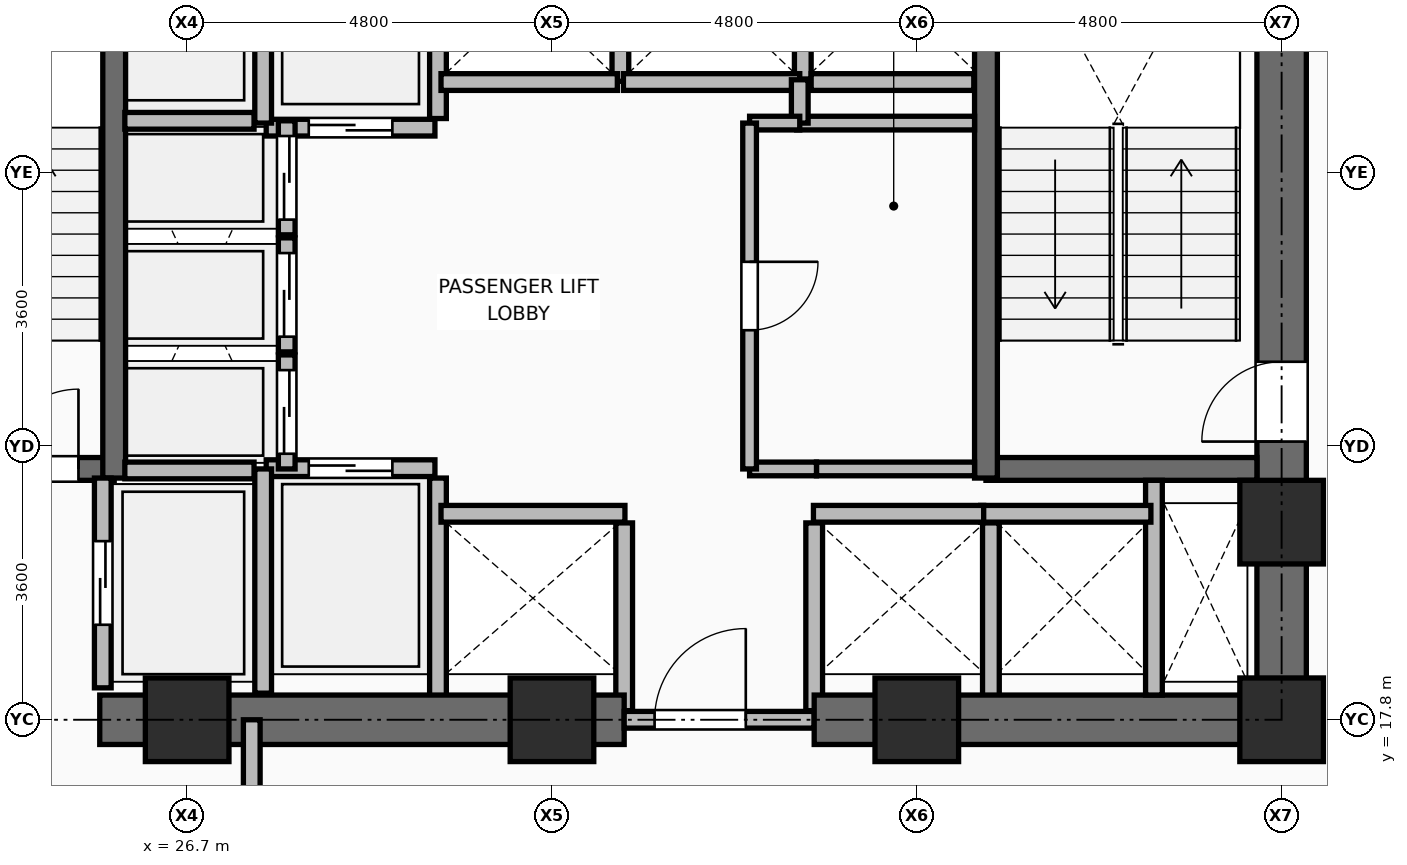
"""IFC4 building model, lengths in metres.
Left out: names, types, materials, properties, quantities, classifications, styles, units other than length and angle.
Written with IfcOpenShell. Run it as: python <this file> out.ifc"""

import sys

from ifc_helpers import new_model, si_unit, direction, frame, frame_2d, origin, origin_2d, place, context, subcontext, project, spatial, rectangle, extrude, element, fill, save


model = new_model("IFC4")
c1 = context("Model", 3, precision=1e-05, world=origin(), true_north=direction((0.0, 1.0)))
c2 = subcontext(c1, "Body", "Model", "MODEL_VIEW")
j1 = project(units=[si_unit("LENGTHUNIT", "METRE"), si_unit("PLANEANGLEUNIT", "RADIAN")], contexts=[c1])
p1 = place(None, origin())
s1 = spatial("IfcSite", under=j1, at=p1, CompositionType="ELEMENT")
p2 = place(p1, origin())
s2 = spatial("IfcBuilding", under=s1, at=p2, CompositionType="ELEMENT")
p3 = place(p2, frame((0.0, 0.0, 57.0)))
s3 = spatial("IfcBuildingStorey", under=s2, at=p3, CompositionType="ELEMENT", Elevation=57.0)
for number, where, z_axis, x_axis in (
    (1, (26.7, 17.8, 0.0), (0.0, 0.0, 1.0), (1.0, 0.0, 0.0)),
    (2, (31.5, 17.8, 0.0), (0.0, 0.0, 1.0), (1.0, 0.0, 0.0)),
    (3, (36.3, 17.8, 0.0), (0.0, 0.0, 1.0), (1.0, 0.0, 0.0)),
    (4, (41.1, 17.8, 0.0), (0.0, 0.0, 1.0), (1.0, 0.0, 0.0)),
    (5, (41.1, 20.4, 0.0), (0.0, 0.0, 1.0), (1.0, 0.0, 0.0)),
):
    element("IfcColumn", number, at=place(p3, frame(where, z_axis=z_axis, x_axis=x_axis)), inside=s3, PredefinedType="COLUMN", context=c2, shape_type="SweptSolid", body=[
        extrude(rectangle(XDim=1.1, YDim=1.1, at=origin_2d()), origin(), (0.0, 0.0, 1.0), 3.75),
    ])
p4 = place(p3, frame((30.0, 18.08, 0.0), z_axis=(0.0, 0.0, 1.0), x_axis=(0.0, 1.0, 0.0)))
e6 = element("IfcWall", 6, at=p4, inside=s3, PredefinedType="PARTITIONING", context=c2, shape_type="SweptSolid", body=[
    extrude(rectangle(XDim=2.9, YDim=0.22, at=frame_2d((1.45, 0.0))), origin(), (0.0, 0.0, 1.0), 3.545),
])
for number, where, z_axis, x_axis in (
    (7, (32.45, 17.92, 0.0), (0.0, 0.0, 1.0), (0.0, 1.0, 0.0)),
    (8, (34.95, 17.92, 0.0), (0.0, 0.0, 1.0), (0.0, 1.0, 0.0)),
):
    element("IfcWall", number, at=place(p3, frame(where, z_axis=z_axis, x_axis=x_axis)), inside=s3, PredefinedType="PARTITIONING", context=c2, shape_type="SweptSolid", body=[
        extrude(rectangle(XDim=2.47, YDim=0.22, at=frame_2d((1.235, 0.0))), origin(), (0.0, 0.0, 1.0), 2.928),
    ])
p5 = place(p3, frame((37.275, 18.08, 0.0), z_axis=(0.0, 0.0, 1.0), x_axis=(0.0, 1.0, 0.0)))
e9 = element("IfcWall", 9, at=p5, inside=s3, PredefinedType="PARTITIONING", context=c2, shape_type="SweptSolid", body=[
    extrude(rectangle(XDim=2.31, YDim=0.22, at=frame_2d((1.155, 0.0))), origin(), (0.0, 0.0, 1.0), 3.545),
])
p6 = place(p3, frame((30.0, 25.71, 0.0), z_axis=(0.0, 0.0, 1.0), x_axis=(0.0, 1.0, 0.0)))
e10 = element("IfcWall", 10, at=p6, inside=s3, PredefinedType="PARTITIONING", context=c2, shape_type="SweptSolid", body=[
    extrude(rectangle(XDim=2.73, YDim=0.22, at=frame_2d((1.365, 0.0))), origin(), (0.0, 0.0, 1.0), 3.545),
])
p7 = place(p3, frame((32.4, 26.2, 0.0), z_axis=(0.0, 0.0, 1.0), x_axis=(0.0, 1.0, 0.0)))
e11 = element("IfcWall", 11, at=p7, inside=s3, PredefinedType="PARTITIONING", context=c2, shape_type="SweptSolid", body=[
    extrude(rectangle(XDim=2.24, YDim=0.22, at=frame_2d((1.12, 0.0))), origin(), (0.0, 0.0, 1.0), 3.545),
])
p8 = place(p3, frame((34.8, 26.23, 0.0), z_axis=(0.0, 0.0, 1.0), x_axis=(0.0, 1.0, 0.0)))
e12 = element("IfcWall", 12, at=p8, inside=s3, PredefinedType="PARTITIONING", context=c2, shape_type="SweptSolid", body=[
    extrude(rectangle(XDim=2.21, YDim=0.22, at=frame_2d((1.105, 0.0))), origin(), (0.0, 0.0, 1.0), 3.545),
])
p9 = place(p3, frame((34.91, 26.19, 0.0), z_axis=(0.0, 0.0, 1.0), x_axis=(1.0, 0.0, 0.0)))
e13 = element("IfcWall", 13, at=p9, inside=s3, PredefinedType="PARTITIONING", context=c2, shape_type="SweptSolid", body=[
    extrude(rectangle(XDim=2.14, YDim=0.22, at=frame_2d((1.07, 0.0))), origin(), (0.0, 0.0, 1.0), 3.545),
])
p10 = place(p3, frame((25.55, 17.8, 0.0), z_axis=(0.0, 0.0, 1.0), x_axis=(1.0, 0.0, 0.0)))
e14 = element("IfcWall", 14, at=p10, inside=s3, PredefinedType="SHEAR", context=c2, shape_type="SweptSolid", body=[
    extrude(rectangle(XDim=6.9, YDim=0.65, at=frame_2d((3.45, 0.0))), origin(), (0.0, 0.0, 1.0), 3.57),
])
p11 = place(p3, frame((32.45, 17.8, 0.0), z_axis=(0.0, 0.0, 1.0), x_axis=(1.0, 0.0, 0.0)))
e15 = element("IfcWall", 15, at=p11, inside=s3, PredefinedType="PARTITIONING", context=c2, shape_type="SweptSolid", body=[
    extrude(rectangle(XDim=2.5, YDim=0.22, at=frame_2d((1.25, 0.0))), origin(), (0.0, 0.0, 1.0), 2.928),
])
p12 = place(p11, frame((0.4, 0.0, 0.0)))
e16 = element("IfcOpeningElement", 16, at=p12, cuts=e15, PredefinedType="OPENING", context=c2, shape_type="SweptSolid", body=[
    extrude(rectangle(XDim=1.2, YDim=2.1, at=frame_2d((0.6, 1.05))), frame((0.0, 0.12, 0.0), z_axis=(0.0, -1.0, 0.0), x_axis=(1.0, 0.0, 0.0)), (0.0, 0.0, 1.0), 0.24),
])
p13 = place(p3, frame((34.95, 17.8, 0.0), z_axis=(0.0, 0.0, 1.0), x_axis=(1.0, 0.0, 0.0)))
e17 = element("IfcWall", 17, at=p13, inside=s3, PredefinedType="SHEAR", context=c2, shape_type="SweptSolid", body=[
    extrude(rectangle(XDim=6.475, YDim=0.65, at=frame_2d((3.238, 0.0))), origin(), (0.0, 0.0, 1.0), 3.57),
])
p14 = place(p3, frame((41.1, 18.125, 0.0), z_axis=(0.0, 0.0, 1.0), x_axis=(0.0, 1.0, 0.0)))
e18 = element("IfcWall", 18, at=p14, inside=s3, PredefinedType="SHEAR", context=c2, shape_type="SweptSolid", body=[
    extrude(rectangle(XDim=14.0, YDim=0.65, at=frame_2d((7.0, 0.0))), origin(), (0.0, 0.0, 1.0), 3.57),
])
p15 = place(p14, frame((3.335, 0.0, 0.0)))
e19 = element("IfcOpeningElement", 19, at=p15, cuts=e18, PredefinedType="OPENING", context=c2, shape_type="SweptSolid", body=[
    extrude(rectangle(XDim=1.05, YDim=2.1, at=frame_2d((0.525, 1.05))), frame((0.0, 0.335, 0.0), z_axis=(0.0, -1.0, 0.0), x_axis=(1.0, 0.0, 0.0)), (0.0, 0.0, 1.0), 0.67),
])
p16 = place(p3, frame((22.225, 21.1, 0.0), z_axis=(0.0, 0.0, 1.0), x_axis=(1.0, 0.0, 0.0)))
e20 = element("IfcWall", 20, at=p16, inside=s3, PredefinedType="SHEAR", context=c2, shape_type="SweptSolid", body=[
    extrude(rectangle(XDim=3.515, YDim=0.3, at=frame_2d((1.757, 0.0))), origin(), (0.0, 0.0, 1.0), 3.57),
])
p17 = place(p16, frame((1.995, 0.0, 0.0)))
e21 = element("IfcOpeningElement", 21, at=p17, cuts=e20, PredefinedType="OPENING", context=c2, shape_type="SweptSolid", body=[
    extrude(rectangle(XDim=1.05, YDim=2.1, at=frame_2d((0.525, 1.05))), frame((0.0, 0.16, 0.0), z_axis=(0.0, -1.0, 0.0), x_axis=(1.0, 0.0, 0.0)), (0.0, 0.0, 1.0), 0.32),
])
p18 = place(p3, frame((25.74, 20.98, 0.0), z_axis=(0.0, 0.0, 1.0), x_axis=(0.0, 1.0, 0.0)))
e22 = element("IfcWall", 22, at=p18, inside=s3, PredefinedType="SHEAR", context=c2, shape_type="SweptSolid", body=[
    extrude(rectangle(XDim=7.99, YDim=0.3, at=frame_2d((3.995, 0.0))), origin(), (0.0, 0.0, 1.0), 3.57),
])
p19 = place(p3, frame((37.21, 21.1, 0.0), z_axis=(0.0, 0.0, 1.0), x_axis=(1.0, 0.0, 0.0)))
e23 = element("IfcWall", 23, at=p19, inside=s3, PredefinedType="SHEAR", context=c2, shape_type="SweptSolid", body=[
    extrude(rectangle(XDim=3.565, YDim=0.3, at=frame_2d((1.782, 0.0))), origin(), (0.0, 0.0, 1.0), 3.57),
])
p20 = place(p3, frame((37.21, 20.98, 0.0), z_axis=(0.0, 0.0, 1.0), x_axis=(0.0, 1.0, 0.0)))
e24 = element("IfcWall", 24, at=p20, inside=s3, PredefinedType="SHEAR", context=c2, shape_type="SweptSolid", body=[
    extrude(rectangle(XDim=7.99, YDim=0.3, at=frame_2d((3.995, 0.0))), origin(), (0.0, 0.0, 1.0), 3.57),
])
p21 = place(p3, frame((39.42, 18.125, 0.0), z_axis=(0.0, 0.0, 1.0), x_axis=(0.0, 1.0, 0.0)))
e25 = element("IfcWall", 25, at=p21, inside=s3, PredefinedType="PARTITIONING", context=c2, shape_type="SweptSolid", body=[
    extrude(rectangle(XDim=2.825, YDim=0.22, at=frame_2d((1.413, 0.0))), origin(), (0.0, 0.0, 1.0), 3.55),
])
p22 = place(p3, frame((25.59, 18.22, 0.0), z_axis=(0.0, 0.0, 1.0), x_axis=(0.0, 1.0, 0.0)))
e26 = element("IfcWall", 26, at=p22, inside=s3, PredefinedType="PARTITIONING", context=c2, shape_type="SweptSolid", body=[
    extrude(rectangle(XDim=2.76, YDim=0.22, at=frame_2d((1.38, 0.0))), origin(), (0.0, 0.0, 1.0), 3.55),
])
p23 = place(p22, frame((0.83, 0.0, 0.0)))
e27 = element("IfcOpeningElement", 27, at=p23, cuts=e26, PredefinedType="OPENING", context=c2, shape_type="SweptSolid", body=[
    extrude(rectangle(XDim=1.1, YDim=2.2, at=frame_2d((0.55, 1.1))), frame((0.0, 0.12, 0.0), z_axis=(0.0, -1.0, 0.0), x_axis=(1.0, 0.0, 0.0)), (0.0, 0.0, 1.0), 0.24),
])
p24 = place(p3, frame((27.74, 21.11, 0.0), z_axis=(0.0, 0.0, 1.0), x_axis=(1.0, 0.0, 0.0)))
e28 = element("IfcWall", 28, at=p24, inside=s3, PredefinedType="PARTITIONING", context=c2, shape_type="SweptSolid", body=[
    extrude(rectangle(XDim=2.22, YDim=0.22, at=frame_2d((1.11, 0.0))), origin(), (0.0, 0.0, 1.0), 3.55),
])
p25 = place(p24, frame((0.56, 0.0, 0.0)))
e29 = element("IfcOpeningElement", 29, at=p25, cuts=e28, PredefinedType="OPENING", context=c2, shape_type="SweptSolid", body=[
    extrude(rectangle(XDim=1.1, YDim=2.2, at=frame_2d((0.55, 1.1))), frame((0.0, 0.12, 0.0), z_axis=(0.0, -1.0, 0.0), x_axis=(1.0, 0.0, 0.0)), (0.0, 0.0, 1.0), 0.24),
])
p26 = place(p3, frame((27.74, 25.59, 0.0), z_axis=(0.0, 0.0, 1.0), x_axis=(1.0, 0.0, 0.0)))
e30 = element("IfcWall", 30, at=p26, inside=s3, PredefinedType="PARTITIONING", context=c2, shape_type="SweptSolid", body=[
    extrude(rectangle(XDim=2.22, YDim=0.22, at=frame_2d((1.11, 0.0))), origin(), (0.0, 0.0, 1.0), 3.55),
])
p27 = place(p26, frame((0.56, 0.0, 0.0)))
e31 = element("IfcOpeningElement", 31, at=p27, cuts=e30, PredefinedType="OPENING", context=c2, shape_type="SweptSolid", body=[
    extrude(rectangle(XDim=1.1, YDim=2.2, at=frame_2d((0.55, 1.1))), frame((0.0, 0.12, 0.0), z_axis=(0.0, -1.0, 0.0), x_axis=(1.0, 0.0, 0.0)), (0.0, 0.0, 1.0), 0.24),
])
p28 = place(p3, frame((30.04, 20.51, 0.0), z_axis=(0.0, 0.0, 1.0), x_axis=(1.0, 0.0, 0.0)))
e32 = element("IfcWall", 32, at=p28, inside=s3, PredefinedType="PARTITIONING", context=c2, shape_type="SweptSolid", body=[
    extrude(rectangle(XDim=2.42, YDim=0.22, at=frame_2d((1.21, 0.0))), origin(), (0.0, 0.0, 1.0), 3.55),
])
for number, where, z_axis, x_axis in (
    (33, (37.14, 20.51, 0.0), (0.0, 0.0, 1.0), (1.0, 0.0, 0.0)),
    (34, (34.94, 20.51, 0.0), (0.0, 0.0, 1.0), (1.0, 0.0, 0.0)),
):
    element("IfcWall", number, at=place(p3, frame(where, z_axis=z_axis, x_axis=x_axis)), inside=s3, PredefinedType="PARTITIONING", context=c2, shape_type="SweptSolid", body=[
        extrude(rectangle(XDim=2.24, YDim=0.22, at=frame_2d((1.12, 0.0))), origin(), (0.0, 0.0, 1.0), 3.55),
    ])
for number, where, z_axis, x_axis in (
    (35, (30.04, 26.19, 0.0), (0.0, 0.0, 1.0), (1.0, 0.0, 0.0)),
    (36, (32.44, 26.19, 0.0), (0.0, 0.0, 1.0), (1.0, 0.0, 0.0)),
):
    element("IfcWall", number, at=place(p3, frame(where, z_axis=z_axis, x_axis=x_axis)), inside=s3, PredefinedType="PARTITIONING", context=c2, shape_type="SweptSolid", body=[
        extrude(rectangle(XDim=2.32, YDim=0.22, at=frame_2d((1.16, 0.0))), origin(), (0.0, 0.0, 1.0), 3.55),
    ])
p29 = place(p3, frame((28.01, 21.1, 0.0), z_axis=(0.0, 0.0, 1.0), x_axis=(0.0, 1.0, 0.0)))
e37 = element("IfcWall", 37, at=p29, inside=s3, PredefinedType="PARTITIONING", context=c2, shape_type="SweptSolid", body=[
    extrude(rectangle(XDim=1.5, YDim=0.22, at=frame_2d((0.75, 0.0))), origin(), (0.0, 0.0, 1.0), 3.55),
])
p30 = place(p29, frame((0.2, 0.0, 0.0)))
e38 = element("IfcOpeningElement", 38, at=p30, cuts=e37, PredefinedType="OPENING", context=c2, shape_type="SweptSolid", body=[
    extrude(rectangle(XDim=1.1, YDim=2.2, at=frame_2d((0.55, 1.1))), frame((0.0, 0.12, 0.0), z_axis=(0.0, -1.0, 0.0), x_axis=(1.0, 0.0, 0.0)), (0.0, 0.0, 1.0), 0.24),
])
p31 = place(p3, frame((28.01, 22.64, 0.0), z_axis=(0.0, 0.0, 1.0), x_axis=(0.0, 1.0, 0.0)))
e39 = element("IfcWall", 39, at=p31, inside=s3, PredefinedType="PARTITIONING", context=c2, shape_type="SweptSolid", body=[
    extrude(rectangle(XDim=1.5, YDim=0.22, at=frame_2d((0.75, 0.0))), origin(), (0.0, 0.0, 1.0), 3.55),
])
p32 = place(p31, frame((0.2, 0.0, 0.0)))
e40 = element("IfcOpeningElement", 40, at=p32, cuts=e39, PredefinedType="OPENING", context=c2, shape_type="SweptSolid", body=[
    extrude(rectangle(XDim=1.1, YDim=2.2, at=frame_2d((0.55, 1.1))), frame((0.0, 0.12, 0.0), z_axis=(0.0, -1.0, 0.0), x_axis=(1.0, 0.0, 0.0)), (0.0, 0.0, 1.0), 0.24),
])
p33 = place(p3, frame((28.01, 24.18, 0.0), z_axis=(0.0, 0.0, 1.0), x_axis=(0.0, 1.0, 0.0)))
e41 = element("IfcWall", 41, at=p33, inside=s3, PredefinedType="PARTITIONING", context=c2, shape_type="SweptSolid", body=[
    extrude(rectangle(XDim=1.5, YDim=0.22, at=frame_2d((0.75, 0.0))), origin(), (0.0, 0.0, 1.0), 3.55),
])
p34 = place(p33, frame((0.2, 0.0, 0.0)))
e42 = element("IfcOpeningElement", 42, at=p34, cuts=e41, PredefinedType="OPENING", context=c2, shape_type="SweptSolid", body=[
    extrude(rectangle(XDim=1.1, YDim=2.2, at=frame_2d((0.55, 1.1))), frame((0.0, 0.12, 0.0), z_axis=(0.0, -1.0, 0.0), x_axis=(1.0, 0.0, 0.0)), (0.0, 0.0, 1.0), 0.24),
])
p35 = place(p3, frame((27.7, 18.15, 0.0), z_axis=(0.0, 0.0, 1.0), x_axis=(0.0, 1.0, 0.0)))
e43 = element("IfcWall", 43, at=p35, inside=s3, PredefinedType="PARTITIONING", context=c2, shape_type="SweptSolid", body=[
    extrude(rectangle(XDim=2.95, YDim=0.22, at=frame_2d((1.475, 0.0))), origin(), (0.0, 0.0, 1.0), 3.55),
])
p36 = place(p3, frame((27.7, 25.65, 0.0), z_axis=(0.0, 0.0, 1.0), x_axis=(0.0, 1.0, 0.0)))
e44 = element("IfcWall", 44, at=p36, inside=s3, PredefinedType="PARTITIONING", context=c2, shape_type="SweptSolid", body=[
    extrude(rectangle(XDim=3.0, YDim=0.22, at=frame_2d((1.5, 0.0))), origin(), (0.0, 0.0, 1.0), 3.55),
])
for number, where, z_axis, x_axis in (
    (45, (25.88, 21.08, 0.0), (0.0, 0.0, 1.0), (1.0, 0.0, 0.0)),
    (46, (25.88, 25.68, 0.0), (0.0, 0.0, 1.0), (1.0, 0.0, 0.0)),
):
    element("IfcWall", number, at=place(p3, frame(where, z_axis=z_axis, x_axis=x_axis)), inside=s3, PredefinedType="PARTITIONING", context=c2, shape_type="SweptSolid", body=[
        extrude(rectangle(XDim=1.7, YDim=0.22, at=frame_2d((0.85, 0.0))), origin(), (0.0, 0.0, 1.0), 3.55),
    ])
p37 = place(p3, frame((34.98, 21.1, 0.0), z_axis=(0.0, 0.0, 1.0), x_axis=(1.0, 0.0, 0.0)))
e47 = element("IfcWall", 47, at=p37, inside=s3, PredefinedType="PARTITIONING", context=c2, shape_type="SweptSolid", body=[
    extrude(rectangle(XDim=2.08, YDim=0.18, at=frame_2d((1.04, 0.0))), origin(), (0.0, 0.0, 1.0), 3.55),
])
p38 = place(p3, frame((34.72, 25.65, 0.0), z_axis=(0.0, 0.0, 1.0), x_axis=(1.0, 0.0, 0.0)))
e48 = element("IfcWall", 48, at=p38, inside=s3, PredefinedType="PARTITIONING", context=c2, shape_type="SweptSolid", body=[
    extrude(rectangle(XDim=2.34, YDim=0.18, at=frame_2d((1.17, 0.0))), origin(), (0.0, 0.0, 1.0), 3.55),
])
p39 = place(p3, frame((34.76, 25.65, 0.0), z_axis=(0.0, 0.0, 1.0), x_axis=(0.0, 1.0, 0.0)))
e49 = element("IfcWall", 49, at=p39, inside=s3, PredefinedType="PARTITIONING", context=c2, shape_type="SweptSolid", body=[
    extrude(rectangle(XDim=0.57, YDim=0.22, at=frame_2d((0.285, 0.0))), origin(), (0.0, 0.0, 1.0), 3.55),
])
p40 = place(p3, frame((34.1, 21.1, 0.0), z_axis=(0.0, 0.0, 1.0), x_axis=(1.0, 0.0, 0.0)))
e50 = element("IfcWall", 50, at=p40, inside=s3, PredefinedType="PARTITIONING", context=c2, shape_type="SweptSolid", body=[
    extrude(rectangle(XDim=0.88, YDim=0.18, at=frame_2d((0.44, 0.0))), origin(), (0.0, 0.0, 1.0), 3.55),
])
p41 = place(p3, frame((34.1, 25.65, 0.0), z_axis=(0.0, 0.0, 1.0), x_axis=(1.0, 0.0, 0.0)))
e51 = element("IfcWall", 51, at=p41, inside=s3, PredefinedType="PARTITIONING", context=c2, shape_type="SweptSolid", body=[
    extrude(rectangle(XDim=0.66, YDim=0.18, at=frame_2d((0.33, 0.0))), origin(), (0.0, 0.0, 1.0), 3.55),
])
p42 = place(p3, frame((34.1, 21.1, 0.0), z_axis=(0.0, 0.0, 1.0), x_axis=(0.0, 1.0, 0.0)))
e52 = element("IfcWall", 52, at=p42, inside=s3, PredefinedType="PARTITIONING", context=c2, shape_type="SweptSolid", body=[
    extrude(rectangle(XDim=4.55, YDim=0.18, at=frame_2d((2.275, 0.0))), origin(), (0.0, 0.0, 1.0), 3.55),
])
p43 = place(p42, frame((1.825, 0.0, 0.0)))
e53 = element("IfcOpeningElement", 53, at=p43, cuts=e52, PredefinedType="OPENING", context=c2, shape_type="SweptSolid", body=[
    extrude(rectangle(XDim=0.9, YDim=2.1, at=frame_2d((0.45, 1.05))), frame((0.0, 0.1, 0.0), z_axis=(0.0, -1.0, 0.0), x_axis=(1.0, 0.0, 0.0)), (0.0, 0.0, 1.0), 0.2),
])
p44 = place(p3, frame((27.55, 14.35, 0.0), z_axis=(0.0, 0.0, 1.0), x_axis=(0.0, 1.0, 0.0)))
e54 = element("IfcWall", 54, at=p44, inside=s3, PredefinedType="PARTITIONING", context=c2, shape_type="SweptSolid", body=[
    extrude(rectangle(XDim=3.45, YDim=0.22, at=frame_2d((1.725, 0.0))), origin(), (0.0, 0.0, 1.0), 2.928),
])
p45 = place(p44, frame((1.175, 0.0, 0.0)))
e55 = element("IfcOpeningElement", 55, at=p45, cuts=e54, PredefinedType="OPENING", context=c2, shape_type="SweptSolid", body=[
    extrude(rectangle(XDim=1.1, YDim=2.1, at=frame_2d((0.55, 1.05))), frame((0.0, 0.12, 0.0), z_axis=(0.0, -1.0, 0.0), x_axis=(1.0, 0.0, 0.0)), (0.0, 0.0, 1.0), 0.24),
])
p46 = place(p12, origin())
e56 = element("IfcDoor", 56, at=p46, inside=s3, OperationType="SINGLE_SWING_RIGHT", PredefinedType="DOOR", context=c2, shape_type="SweptSolid", body=[
    extrude(rectangle(XDim=1.2, YDim=2.1, at=frame_2d((0.6, 1.05))), frame((0.0, 0.025, 0.0), z_axis=(0.0, -1.0, 0.0), x_axis=(1.0, 0.0, 0.0)), (0.0, 0.0, 1.0), 0.05),
])
fill(e16, e56)
p47 = place(p17, origin())
e57 = element("IfcDoor", 57, at=p47, inside=s3, OperationType="SINGLE_SWING_RIGHT", PredefinedType="DOOR", context=c2, shape_type="SweptSolid", body=[
    extrude(rectangle(XDim=1.05, YDim=2.1, at=frame_2d((0.525, 1.05))), frame((0.0, 0.025, 0.0), z_axis=(0.0, -1.0, 0.0), x_axis=(1.0, 0.0, 0.0)), (0.0, 0.0, 1.0), 0.05),
])
fill(e21, e57)
p48 = place(p15, origin())
e58 = element("IfcDoor", 58, at=p48, inside=s3, OperationType="SINGLE_SWING_LEFT", PredefinedType="DOOR", context=c2, shape_type="SweptSolid", body=[
    extrude(rectangle(XDim=1.05, YDim=2.1, at=frame_2d((0.525, 1.05))), frame((0.0, 0.025, 0.0), z_axis=(0.0, -1.0, 0.0), x_axis=(1.0, 0.0, 0.0)), (0.0, 0.0, 1.0), 0.05),
])
fill(e19, e58)
p49 = place(p23, origin())
e59 = element("IfcDoor", 59, at=p49, inside=s3, OperationType="DOUBLE_DOOR_SLIDING", PredefinedType="DOOR", context=c2, shape_type="SweptSolid", body=[
    extrude(rectangle(XDim=1.1, YDim=2.2, at=frame_2d((0.55, 1.1))), frame((0.0, 0.025, 0.0), z_axis=(0.0, -1.0, 0.0), x_axis=(1.0, 0.0, 0.0)), (0.0, 0.0, 1.0), 0.05),
])
fill(e27, e59)
p50 = place(p25, origin())
e60 = element("IfcDoor", 60, at=p50, inside=s3, OperationType="DOUBLE_DOOR_SLIDING", PredefinedType="DOOR", context=c2, shape_type="SweptSolid", body=[
    extrude(rectangle(XDim=1.1, YDim=2.2, at=frame_2d((0.55, 1.1))), frame((0.0, 0.025, 0.0), z_axis=(0.0, -1.0, 0.0), x_axis=(1.0, 0.0, 0.0)), (0.0, 0.0, 1.0), 0.05),
])
fill(e29, e60)
p51 = place(p27, frame((1.1, 0.0, 0.0), z_axis=(0.0, 0.0, 1.0), x_axis=(-1.0, 0.0, 0.0)))
e61 = element("IfcDoor", 61, at=p51, inside=s3, OperationType="DOUBLE_DOOR_SLIDING", PredefinedType="DOOR", context=c2, shape_type="SweptSolid", body=[
    extrude(rectangle(XDim=1.1, YDim=2.2, at=frame_2d((0.55, 1.1))), frame((0.0, 0.025, 0.0), z_axis=(0.0, -1.0, 0.0), x_axis=(1.0, 0.0, 0.0)), (0.0, 0.0, 1.0), 0.05),
])
fill(e31, e61)
p52 = place(p30, frame((1.1, 0.0, 0.0), z_axis=(0.0, 0.0, 1.0), x_axis=(-1.0, 0.0, 0.0)))
e62 = element("IfcDoor", 62, at=p52, inside=s3, OperationType="DOUBLE_DOOR_SLIDING", PredefinedType="DOOR", context=c2, shape_type="SweptSolid", body=[
    extrude(rectangle(XDim=1.1, YDim=2.2, at=frame_2d((0.55, 1.1))), frame((0.0, 0.025, 0.0), z_axis=(0.0, -1.0, 0.0), x_axis=(1.0, 0.0, 0.0)), (0.0, 0.0, 1.0), 0.05),
])
fill(e38, e62)
p53 = place(p32, frame((1.1, 0.0, 0.0), z_axis=(0.0, 0.0, 1.0), x_axis=(-1.0, 0.0, 0.0)))
e63 = element("IfcDoor", 63, at=p53, inside=s3, OperationType="DOUBLE_DOOR_SLIDING", PredefinedType="DOOR", context=c2, shape_type="SweptSolid", body=[
    extrude(rectangle(XDim=1.1, YDim=2.2, at=frame_2d((0.55, 1.1))), frame((0.0, 0.025, 0.0), z_axis=(0.0, -1.0, 0.0), x_axis=(1.0, 0.0, 0.0)), (0.0, 0.0, 1.0), 0.05),
])
fill(e40, e63)
p54 = place(p34, frame((1.1, 0.0, 0.0), z_axis=(0.0, 0.0, 1.0), x_axis=(-1.0, 0.0, 0.0)))
e64 = element("IfcDoor", 64, at=p54, inside=s3, OperationType="DOUBLE_DOOR_SLIDING", PredefinedType="DOOR", context=c2, shape_type="SweptSolid", body=[
    extrude(rectangle(XDim=1.1, YDim=2.2, at=frame_2d((0.55, 1.1))), frame((0.0, 0.025, 0.0), z_axis=(0.0, -1.0, 0.0), x_axis=(1.0, 0.0, 0.0)), (0.0, 0.0, 1.0), 0.05),
])
fill(e42, e64)
p55 = place(p43, frame((0.9, 0.0, 0.0), z_axis=(0.0, 0.0, 1.0), x_axis=(-1.0, 0.0, 0.0)))
e65 = element("IfcDoor", 65, at=p55, inside=s3, OperationType="SINGLE_SWING_LEFT", PredefinedType="DOOR", context=c2, shape_type="SweptSolid", body=[
    extrude(rectangle(XDim=0.9, YDim=2.1, at=frame_2d((0.45, 1.05))), frame((0.0, 0.025, 0.0), z_axis=(0.0, -1.0, 0.0), x_axis=(1.0, 0.0, 0.0)), (0.0, 0.0, 1.0), 0.05),
])
fill(e53, e65)
save(model, sys.argv[1])
